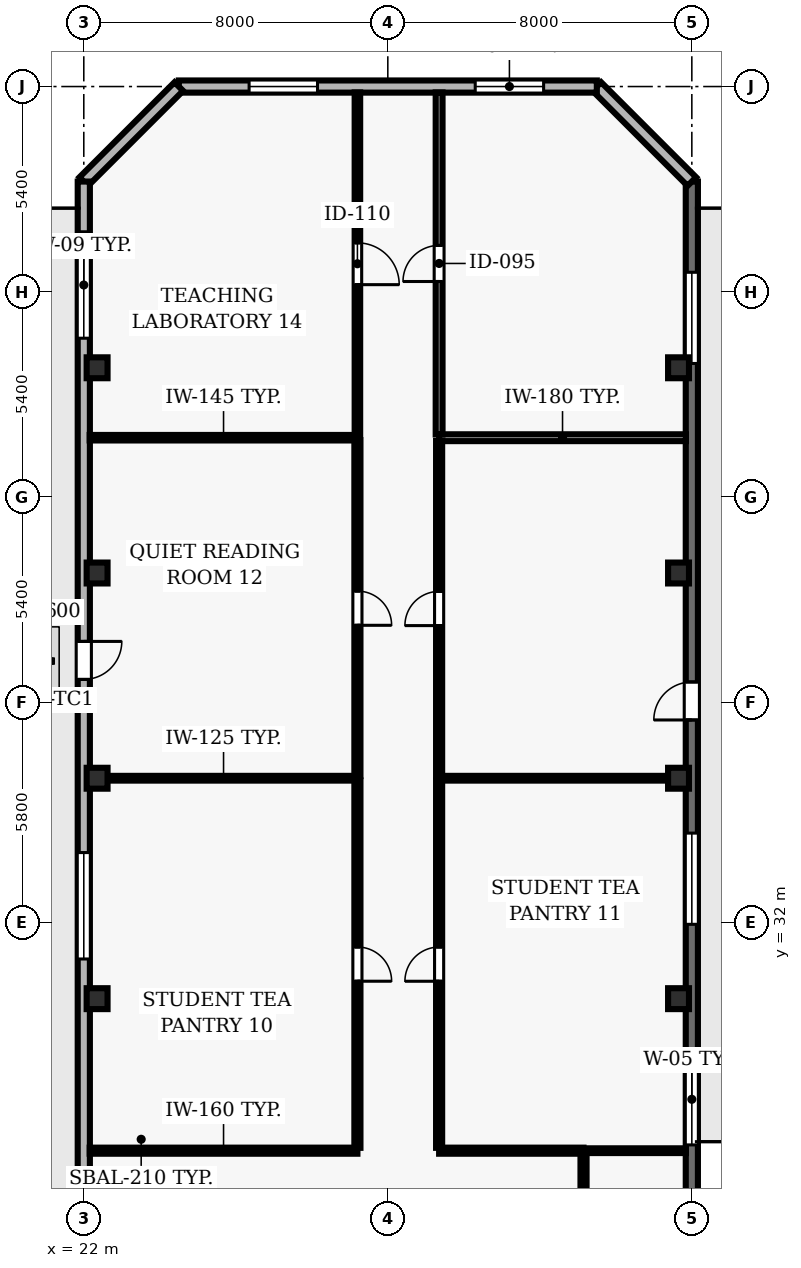
"""IFC4 building model, lengths in metres.
Left out: names, types, materials, properties, quantities, classifications, styles, units other than length and angle.
Written with IfcOpenShell. Run it as: python <this file> out.ifc"""

import sys

from ifc_helpers import new_model, si_unit, direction, frame, frame_2d, origin, origin_2d, place, context, subcontext, project, spatial, rectangle, hollow_rectangle, extrude, element, fill, save


model = new_model("IFC4")
c1 = context("Model", 3, precision=1e-05, world=origin(), true_north=direction((0.0, 1.0)))
c2 = subcontext(c1, "Body", "Model", "MODEL_VIEW")
j1 = project(units=[si_unit("LENGTHUNIT", "METRE"), si_unit("PLANEANGLEUNIT", "RADIAN")], contexts=[c1])
p1 = place(None, origin())
s1 = spatial("IfcSite", under=j1, at=p1, CompositionType="ELEMENT")
p2 = place(p1, origin())
s2 = spatial("IfcBuilding", under=s1, at=p2, CompositionType="ELEMENT")
p3 = place(p2, frame((0.0, 0.0, 85.6)))
s3 = spatial("IfcBuildingStorey", under=s2, at=p3, CompositionType="ELEMENT", Elevation=85.6)
for number, where, z_axis, x_axis in (
    (1, (22.35, 30.0, 0.0), (0.0, 0.0, 1.0), (1.0, 0.0, 0.0)),
    (2, (37.65, 30.0, 0.0), (0.0, 0.0, 1.0), (1.0, 0.0, 0.0)),
    (3, (22.35, 35.8, 0.0), (0.0, 0.0, 1.0), (1.0, 0.0, 0.0)),
    (4, (37.65, 35.8, 0.0), (0.0, 0.0, 1.0), (1.0, 0.0, 0.0)),
    (5, (22.35, 41.2, 0.0), (0.0, 0.0, 1.0), (1.0, 0.0, 0.0)),
    (6, (37.65, 41.2, 0.0), (0.0, 0.0, 1.0), (1.0, 0.0, 0.0)),
    (7, (22.35, 46.6, 0.0), (0.0, 0.0, 1.0), (1.0, 0.0, 0.0)),
    (8, (37.65, 46.6, 0.0), (0.0, 0.0, 1.0), (1.0, 0.0, 0.0)),
):
    element("IfcColumn", number, at=place(p3, frame(where, z_axis=z_axis, x_axis=x_axis)), inside=s3, PredefinedType="COLUMN", context=c2, shape_type="SweptSolid", body=[
        extrude(hollow_rectangle(XDim=0.55, YDim=0.55, WallThickness=0.025, at=origin_2d()), origin(), (0.0, 0.0, 1.0), 3.9),
    ])
p4 = place(p3, frame((38.0, 24.0, 0.0), z_axis=(0.0, 0.0, 1.0), x_axis=(0.0, 1.0, 0.0)))
e9 = element("IfcWall", 9, at=p4, inside=s3, PredefinedType="SOLIDWALL", context=c2, shape_type="SweptSolid", body=[
    extrude(rectangle(XDim=27.5, YDim=0.32, at=frame_2d((13.75, 0.0))), origin(), (0.0, 0.0, 1.0), 3.69),
])
p5 = place(p4, frame((13.333, 0.0, 0.0)))
e10 = element("IfcOpeningElement", 10, at=p5, cuts=e9, PredefinedType="OPENING", context=c2, shape_type="SweptSolid", body=[
    extrude(rectangle(XDim=1.0, YDim=2.2, at=frame_2d((0.5, 1.1))), frame((0.0, 0.17, 0.0), z_axis=(0.0, -1.0, 0.0), x_axis=(1.0, 0.0, 0.0)), (0.0, 0.0, 1.0), 0.34),
])
p6 = place(p4, frame((2.152, 0.0, 0.9)))
e11 = element("IfcOpeningElement", 11, at=p6, cuts=e9, PredefinedType="OPENING", context=c2, shape_type="SweptSolid", body=[
    extrude(rectangle(XDim=2.4, YDim=1.6, at=frame_2d((1.2, 0.8))), frame((0.0, 0.17, 0.0), z_axis=(0.0, -1.0, 0.0), x_axis=(1.0, 0.0, 0.0)), (0.0, 0.0, 1.0), 0.34),
])
p7 = place(p4, frame((7.956, 0.0, 0.9)))
e12 = element("IfcOpeningElement", 12, at=p7, cuts=e9, PredefinedType="OPENING", context=c2, shape_type="SweptSolid", body=[
    extrude(rectangle(XDim=2.4, YDim=1.6, at=frame_2d((1.2, 0.8))), frame((0.0, 0.17, 0.0), z_axis=(0.0, -1.0, 0.0), x_axis=(1.0, 0.0, 0.0)), (0.0, 0.0, 1.0), 0.34),
])
p8 = place(p4, frame((22.713, 0.0, 0.9)))
e13 = element("IfcOpeningElement", 13, at=p8, cuts=e9, PredefinedType="OPENING", context=c2, shape_type="SweptSolid", body=[
    extrude(rectangle(XDim=2.4, YDim=1.6, at=frame_2d((1.2, 0.8))), frame((0.0, 0.17, 0.0), z_axis=(0.0, -1.0, 0.0), x_axis=(1.0, 0.0, 0.0)), (0.0, 0.0, 1.0), 0.34),
])
p9 = place(p3, frame((38.0, 51.5, 0.0), z_axis=(0.0, 0.0, 1.0), x_axis=(-0.707106781187, 0.707106781187, 0.0)))
e14 = element("IfcWall", 14, at=p9, inside=s3, PredefinedType="SOLIDWALL", context=c2, shape_type="SweptSolid", body=[
    extrude(rectangle(XDim=3.536, YDim=0.32, at=frame_2d((1.768, 0.0))), origin(), (0.0, 0.0, 1.0), 3.69),
])
p10 = place(p3, frame((35.5, 54.0, 0.0), z_axis=(0.0, 0.0, 1.0), x_axis=(-1.0, 0.0, 0.0)))
e15 = element("IfcWall", 15, at=p10, inside=s3, PredefinedType="SOLIDWALL", context=c2, shape_type="SweptSolid", body=[
    extrude(rectangle(XDim=11.0, YDim=0.32, at=frame_2d((5.5, 0.0))), origin(), (0.0, 0.0, 1.0), 3.69),
])
p11 = place(p10, frame((1.4, 0.0, 0.9)))
e16 = element("IfcOpeningElement", 16, at=p11, cuts=e15, PredefinedType="OPENING", context=c2, shape_type="SweptSolid", body=[
    extrude(rectangle(XDim=1.8, YDim=1.8, at=frame_2d((0.9, 0.9))), frame((0.0, 0.17, 0.0), z_axis=(0.0, -1.0, 0.0), x_axis=(1.0, 0.0, 0.0)), (0.0, 0.0, 1.0), 0.34),
])
p12 = place(p10, frame((7.35, 0.0, 0.9)))
e17 = element("IfcOpeningElement", 17, at=p12, cuts=e15, PredefinedType="OPENING", context=c2, shape_type="SweptSolid", body=[
    extrude(rectangle(XDim=1.8, YDim=1.8, at=frame_2d((0.9, 0.9))), frame((0.0, 0.17, 0.0), z_axis=(0.0, -1.0, 0.0), x_axis=(1.0, 0.0, 0.0)), (0.0, 0.0, 1.0), 0.34),
])
p13 = place(p3, frame((24.5, 54.0, 0.0), z_axis=(0.0, 0.0, 1.0), x_axis=(-0.707106781187, -0.707106781187, 0.0)))
e18 = element("IfcWall", 18, at=p13, inside=s3, PredefinedType="SOLIDWALL", context=c2, shape_type="SweptSolid", body=[
    extrude(rectangle(XDim=3.536, YDim=0.32, at=frame_2d((1.768, 0.0))), origin(), (0.0, 0.0, 1.0), 3.69),
])
p14 = place(p3, frame((22.0, 51.5, 0.0), z_axis=(0.0, 0.0, 1.0), x_axis=(0.0, -1.0, 0.0)))
e19 = element("IfcWall", 19, at=p14, inside=s3, PredefinedType="SOLIDWALL", context=c2, shape_type="SweptSolid", body=[
    extrude(rectangle(XDim=49.0, YDim=0.32, at=frame_2d((24.5, 0.0))), origin(), (0.0, 0.0, 1.0), 3.69),
])
p15 = place(p14, frame((12.1, 0.0, 0.0)))
e20 = element("IfcOpeningElement", 20, at=p15, cuts=e19, PredefinedType="OPENING", context=c2, shape_type="SweptSolid", body=[
    extrude(rectangle(XDim=1.0, YDim=2.2, at=frame_2d((0.5, 1.1))), frame((0.0, 0.17, 0.0), z_axis=(0.0, -1.0, 0.0), x_axis=(1.0, 0.0, 0.0)), (0.0, 0.0, 1.0), 0.34),
])
p16 = place(p14, frame((1.322, 0.0, 0.9)))
e21 = element("IfcOpeningElement", 21, at=p16, cuts=e19, PredefinedType="OPENING", context=c2, shape_type="SweptSolid", body=[
    extrude(rectangle(XDim=2.8, YDim=1.8, at=frame_2d((1.4, 0.9))), frame((0.0, 0.17, 0.0), z_axis=(0.0, -1.0, 0.0), x_axis=(1.0, 0.0, 0.0)), (0.0, 0.0, 1.0), 0.34),
])
p17 = place(p14, frame((17.656, 0.0, 0.9)))
e22 = element("IfcOpeningElement", 22, at=p17, cuts=e19, PredefinedType="OPENING", context=c2, shape_type="SweptSolid", body=[
    extrude(rectangle(XDim=2.8, YDim=1.8, at=frame_2d((1.4, 0.9))), frame((0.0, 0.17, 0.0), z_axis=(0.0, -1.0, 0.0), x_axis=(1.0, 0.0, 0.0)), (0.0, 0.0, 1.0), 0.34),
])
p18 = place(p14, frame((28.994, 0.0, 0.9)))
e23 = element("IfcOpeningElement", 23, at=p18, cuts=e19, PredefinedType="OPENING", context=c2, shape_type="SweptSolid", body=[
    extrude(rectangle(XDim=2.8, YDim=1.8, at=frame_2d((1.4, 0.9))), frame((0.0, 0.17, 0.0), z_axis=(0.0, -1.0, 0.0), x_axis=(1.0, 0.0, 0.0)), (0.0, 0.0, 1.0), 0.34),
])
p19 = place(p14, frame((33.089, 0.0, 0.9)))
e24 = element("IfcOpeningElement", 24, at=p19, cuts=e19, PredefinedType="OPENING", context=c2, shape_type="SweptSolid", body=[
    extrude(rectangle(XDim=2.8, YDim=1.8, at=frame_2d((1.4, 0.9))), frame((0.0, 0.17, 0.0), z_axis=(0.0, -1.0, 0.0), x_axis=(1.0, 0.0, 0.0)), (0.0, 0.0, 1.0), 0.34),
])
p20 = place(p14, frame((39.433, 0.0, 0.9)))
e25 = element("IfcOpeningElement", 25, at=p20, cuts=e19, PredefinedType="OPENING", context=c2, shape_type="SweptSolid", body=[
    extrude(rectangle(XDim=2.8, YDim=1.8, at=frame_2d((1.4, 0.9))), frame((0.0, 0.17, 0.0), z_axis=(0.0, -1.0, 0.0), x_axis=(1.0, 0.0, 0.0)), (0.0, 0.0, 1.0), 0.34),
])
p21 = place(p3, frame((29.2, 26.0, 0.0), z_axis=(0.0, 0.0, 1.0), x_axis=(-1.0, 0.0, 0.0)))
e26 = element("IfcWall", 26, at=p21, inside=s3, PredefinedType="PARTITIONING", context=c2, shape_type="SweptSolid", body=[
    extrude(rectangle(XDim=7.045, YDim=0.16, at=frame_2d((3.522, 0.0))), origin(), (0.0, 0.0, 1.0), 3.69),
])
p22 = place(p3, frame((29.2, 35.8, 0.0), z_axis=(0.0, 0.0, 1.0), x_axis=(-1.0, 0.0, 0.0)))
e27 = element("IfcWall", 27, at=p22, inside=s3, PredefinedType="PARTITIONING", context=c2, shape_type="SweptSolid", body=[
    extrude(rectangle(XDim=7.045, YDim=0.125, at=frame_2d((3.522, 0.0))), origin(), (0.0, 0.0, 1.0), 2.995),
])
p23 = place(p3, frame((29.2, 44.76, 0.0), z_axis=(0.0, 0.0, 1.0), x_axis=(-1.0, 0.0, 0.0)))
e28 = element("IfcWall", 28, at=p23, inside=s3, PredefinedType="PARTITIONING", context=c2, shape_type="SweptSolid", body=[
    extrude(rectangle(XDim=7.045, YDim=0.145, at=frame_2d((3.522, 0.0))), origin(), (0.0, 0.0, 1.0), 3.69),
])
p24 = place(p3, frame((35.15, 26.0, 0.0), z_axis=(0.0, 0.0, 1.0), x_axis=(-1.0, 0.0, 0.0)))
e29 = element("IfcWall", 29, at=p24, inside=s3, PredefinedType="PARTITIONING", context=c2, shape_type="SweptSolid", body=[
    extrude(rectangle(XDim=3.8, YDim=0.16, at=frame_2d((1.9, 0.0))), origin(), (0.0, 0.0, 1.0), 3.69),
])
p25 = place(p3, frame((35.15, 26.0, 0.0), z_axis=(0.0, 0.0, 1.0), x_axis=(1.0, 0.0, 0.0)))
e30 = element("IfcWall", 30, at=p25, inside=s3, PredefinedType="PARTITIONING", context=c2, shape_type="SweptSolid", body=[
    extrude(rectangle(XDim=2.695, YDim=0.125, at=frame_2d((1.348, 0.0))), origin(), (0.0, 0.0, 1.0), 3.69),
])
p26 = place(p3, frame((37.845, 35.8, 0.0), z_axis=(0.0, 0.0, 1.0), x_axis=(-1.0, 0.0, 0.0)))
e31 = element("IfcWall", 31, at=p26, inside=s3, PredefinedType="PARTITIONING", context=c2, shape_type="SweptSolid", body=[
    extrude(rectangle(XDim=6.495, YDim=0.125, at=frame_2d((3.248, 0.0))), origin(), (0.0, 0.0, 1.0), 2.995),
])
p27 = place(p3, frame((37.845, 44.76, 0.0), z_axis=(0.0, 0.0, 1.0), x_axis=(-1.0, 0.0, 0.0)))
e32 = element("IfcWall", 32, at=p27, inside=s3, PredefinedType="PARTITIONING", context=c2, shape_type="SweptSolid", body=[
    extrude(rectangle(XDim=6.495, YDim=0.18, at=frame_2d((3.248, 0.0))), origin(), (0.0, 0.0, 1.0), 3.69),
])
p28 = place(p3, frame((29.2, 35.742, 0.0), z_axis=(0.0, 0.0, 1.0), x_axis=(0.0, -1.0, 0.0)))
e33 = element("IfcWall", 33, at=p28, inside=s3, PredefinedType="PARTITIONING", context=c2, shape_type="SweptSolid", body=[
    extrude(rectangle(XDim=9.667, YDim=0.16, at=frame_2d((4.833, 0.0))), origin(), (0.0, 0.0, 1.0), 3.69),
])
p29 = place(p28, frame((4.383, 0.0, 0.0)))
e34 = element("IfcOpeningElement", 34, at=p29, cuts=e33, PredefinedType="OPENING", context=c2, shape_type="SweptSolid", body=[
    extrude(rectangle(XDim=0.9, YDim=2.1, at=frame_2d((0.45, 1.05))), frame((0.0, 0.09, 0.0), z_axis=(0.0, -1.0, 0.0), x_axis=(1.0, 0.0, 0.0)), (0.0, 0.0, 1.0), 0.18),
])
p30 = place(p3, frame((29.2, 44.692, 0.0), z_axis=(0.0, 0.0, 1.0), x_axis=(0.0, -1.0, 0.0)))
e35 = element("IfcWall", 35, at=p30, inside=s3, PredefinedType="PARTITIONING", context=c2, shape_type="SweptSolid", body=[
    extrude(rectangle(XDim=8.835, YDim=0.16, at=frame_2d((4.417, 0.0))), origin(), (0.0, 0.0, 1.0), 3.69),
])
p31 = place(p30, frame((3.968, 0.0, 0.0)))
e36 = element("IfcOpeningElement", 36, at=p31, cuts=e35, PredefinedType="OPENING", context=c2, shape_type="SweptSolid", body=[
    extrude(rectangle(XDim=0.9, YDim=2.1, at=frame_2d((0.45, 1.05))), frame((0.0, 0.09, 0.0), z_axis=(0.0, -1.0, 0.0), x_axis=(1.0, 0.0, 0.0)), (0.0, 0.0, 1.0), 0.18),
])
p32 = place(p3, frame((29.2, 53.845, 0.0), z_axis=(0.0, 0.0, 1.0), x_axis=(0.0, -1.0, 0.0)))
e37 = element("IfcWall", 37, at=p32, inside=s3, PredefinedType="PARTITIONING", context=c2, shape_type="SweptSolid", body=[
    extrude(rectangle(XDim=9.017, YDim=0.145, at=frame_2d((4.509, 0.0))), origin(), (0.0, 0.0, 1.0), 3.69),
])
p33 = place(p32, frame((3.958, 0.0, 0.0)))
e38 = element("IfcOpeningElement", 38, at=p33, cuts=e37, PredefinedType="OPENING", context=c2, shape_type="SweptSolid", body=[
    extrude(rectangle(XDim=1.1, YDim=2.15, at=frame_2d((0.55, 1.075))), frame((0.0, 0.083, 0.0), z_axis=(0.0, -1.0, 0.0), x_axis=(1.0, 0.0, 0.0)), (0.0, 0.0, 1.0), 0.165),
])
p34 = place(p3, frame((31.35, 26.075, 0.0), z_axis=(0.0, 0.0, 1.0), x_axis=(0.0, 1.0, 0.0)))
e39 = element("IfcWall", 39, at=p34, inside=s3, PredefinedType="PARTITIONING", context=c2, shape_type="SweptSolid", body=[
    extrude(rectangle(XDim=9.667, YDim=0.16, at=frame_2d((4.833, 0.0))), origin(), (0.0, 0.0, 1.0), 3.69),
])
p35 = place(p34, frame((4.383, 0.0, 0.0)))
e40 = element("IfcOpeningElement", 40, at=p35, cuts=e39, PredefinedType="OPENING", context=c2, shape_type="SweptSolid", body=[
    extrude(rectangle(XDim=0.9, YDim=2.1, at=frame_2d((0.45, 1.05))), frame((0.0, 0.09, 0.0), z_axis=(0.0, -1.0, 0.0), x_axis=(1.0, 0.0, 0.0)), (0.0, 0.0, 1.0), 0.18),
])
p36 = place(p3, frame((31.35, 35.857, 0.0), z_axis=(0.0, 0.0, 1.0), x_axis=(0.0, 1.0, 0.0)))
e41 = element("IfcWall", 41, at=p36, inside=s3, PredefinedType="PARTITIONING", context=c2, shape_type="SweptSolid", body=[
    extrude(rectangle(XDim=8.818, YDim=0.16, at=frame_2d((4.409, 0.0))), origin(), (0.0, 0.0, 1.0), 3.69),
])
p37 = place(p36, frame((3.959, 0.0, 0.0)))
e42 = element("IfcOpeningElement", 42, at=p37, cuts=e41, PredefinedType="OPENING", context=c2, shape_type="SweptSolid", body=[
    extrude(rectangle(XDim=0.9, YDim=2.1, at=frame_2d((0.45, 1.05))), frame((0.0, 0.09, 0.0), z_axis=(0.0, -1.0, 0.0), x_axis=(1.0, 0.0, 0.0)), (0.0, 0.0, 1.0), 0.18),
])
p38 = place(p3, frame((31.35, 44.845, 0.0), z_axis=(0.0, 0.0, 1.0), x_axis=(0.0, 1.0, 0.0)))
e43 = element("IfcWall", 43, at=p38, inside=s3, PredefinedType="PARTITIONING", context=c2, shape_type="SweptSolid", body=[
    extrude(rectangle(XDim=9.0, YDim=0.18, at=frame_2d((4.5, 0.0))), origin(), (0.0, 0.0, 1.0), 3.69),
])
p39 = place(p38, frame((4.025, 0.0, 0.0)))
e44 = element("IfcOpeningElement", 44, at=p39, cuts=e43, PredefinedType="OPENING", context=c2, shape_type="SweptSolid", body=[
    extrude(rectangle(XDim=0.95, YDim=2.1, at=frame_2d((0.475, 1.05))), frame((0.0, 0.1, 0.0), z_axis=(0.0, -1.0, 0.0), x_axis=(1.0, 0.0, 0.0)), (0.0, 0.0, 1.0), 0.2),
])
p40 = place(p3, frame((35.15, 24.07, 0.0), z_axis=(0.0, 0.0, 1.0), x_axis=(0.0, 1.0, 0.0)))
e45 = element("IfcWall", 45, at=p40, inside=s3, PredefinedType="PARTITIONING", context=c2, shape_type="SweptSolid", body=[
    extrude(rectangle(XDim=1.855, YDim=0.16, at=frame_2d((0.927, 0.0))), origin(), (0.0, 0.0, 1.0), 3.69),
])
p41 = place(p5, origin())
e46 = element("IfcDoor", 46, at=p41, inside=s3, OperationType="SINGLE_SWING_LEFT", PredefinedType="DOOR", context=c2, shape_type="SweptSolid", body=[
    extrude(rectangle(XDim=1.0, YDim=2.2, at=frame_2d((0.5, 1.1))), frame((0.0, 0.025, 0.0), z_axis=(0.0, -1.0, 0.0), x_axis=(1.0, 0.0, 0.0)), (0.0, 0.0, 1.0), 0.05),
])
fill(e10, e46)
p42 = place(p6, origin())
e47 = element("IfcWindow", 47, at=p42, inside=s3, PartitioningType="SINGLE_PANEL", PredefinedType="WINDOW", context=c2, shape_type="SweptSolid", body=[
    extrude(rectangle(XDim=2.4, YDim=1.6, at=frame_2d((1.2, 0.8))), frame((0.0, 0.03, 0.0), z_axis=(0.0, -1.0, 0.0), x_axis=(1.0, 0.0, 0.0)), (0.0, 0.0, 1.0), 0.06),
])
fill(e11, e47)
p43 = place(p7, origin())
e48 = element("IfcWindow", 48, at=p43, inside=s3, PartitioningType="SINGLE_PANEL", PredefinedType="WINDOW", context=c2, shape_type="SweptSolid", body=[
    extrude(rectangle(XDim=2.4, YDim=1.6, at=frame_2d((1.2, 0.8))), frame((0.0, 0.03, 0.0), z_axis=(0.0, -1.0, 0.0), x_axis=(1.0, 0.0, 0.0)), (0.0, 0.0, 1.0), 0.06),
])
fill(e12, e48)
p44 = place(p8, origin())
e49 = element("IfcWindow", 49, at=p44, inside=s3, PartitioningType="SINGLE_PANEL", PredefinedType="WINDOW", context=c2, shape_type="SweptSolid", body=[
    extrude(rectangle(XDim=2.4, YDim=1.6, at=frame_2d((1.2, 0.8))), frame((0.0, 0.03, 0.0), z_axis=(0.0, -1.0, 0.0), x_axis=(1.0, 0.0, 0.0)), (0.0, 0.0, 1.0), 0.06),
])
fill(e13, e49)
p45 = place(p11, origin())
e50 = element("IfcWindow", 50, at=p45, inside=s3, PartitioningType="SINGLE_PANEL", PredefinedType="WINDOW", context=c2, shape_type="SweptSolid", body=[
    extrude(rectangle(XDim=1.8, YDim=1.8, at=frame_2d((0.9, 0.9))), frame((0.0, 0.03, 0.0), z_axis=(0.0, -1.0, 0.0), x_axis=(1.0, 0.0, 0.0)), (0.0, 0.0, 1.0), 0.06),
])
fill(e16, e50)
p46 = place(p12, origin())
e51 = element("IfcWindow", 51, at=p46, inside=s3, PartitioningType="SINGLE_PANEL", PredefinedType="WINDOW", context=c2, shape_type="SweptSolid", body=[
    extrude(rectangle(XDim=1.8, YDim=1.8, at=frame_2d((0.9, 0.9))), frame((0.0, 0.03, 0.0), z_axis=(0.0, -1.0, 0.0), x_axis=(1.0, 0.0, 0.0)), (0.0, 0.0, 1.0), 0.06),
])
fill(e17, e51)
p47 = place(p15, origin())
e52 = element("IfcDoor", 52, at=p47, inside=s3, OperationType="SINGLE_SWING_LEFT", PredefinedType="DOOR", context=c2, shape_type="SweptSolid", body=[
    extrude(rectangle(XDim=1.0, YDim=2.2, at=frame_2d((0.5, 1.1))), frame((0.0, 0.025, 0.0), z_axis=(0.0, -1.0, 0.0), x_axis=(1.0, 0.0, 0.0)), (0.0, 0.0, 1.0), 0.05),
])
fill(e20, e52)
p48 = place(p16, origin())
e53 = element("IfcWindow", 53, at=p48, inside=s3, PartitioningType="SINGLE_PANEL", PredefinedType="WINDOW", context=c2, shape_type="SweptSolid", body=[
    extrude(rectangle(XDim=2.8, YDim=1.8, at=frame_2d((1.4, 0.9))), frame((0.0, 0.03, 0.0), z_axis=(0.0, -1.0, 0.0), x_axis=(1.0, 0.0, 0.0)), (0.0, 0.0, 1.0), 0.06),
])
fill(e21, e53)
p49 = place(p17, origin())
e54 = element("IfcWindow", 54, at=p49, inside=s3, PartitioningType="SINGLE_PANEL", PredefinedType="WINDOW", context=c2, shape_type="SweptSolid", body=[
    extrude(rectangle(XDim=2.8, YDim=1.8, at=frame_2d((1.4, 0.9))), frame((0.0, 0.03, 0.0), z_axis=(0.0, -1.0, 0.0), x_axis=(1.0, 0.0, 0.0)), (0.0, 0.0, 1.0), 0.06),
])
fill(e22, e54)
p50 = place(p29, origin())
e55 = element("IfcDoor", 55, at=p50, inside=s3, OperationType="SINGLE_SWING_RIGHT", PredefinedType="DOOR", context=c2, shape_type="SweptSolid", body=[
    extrude(rectangle(XDim=0.9, YDim=2.1, at=frame_2d((0.45, 1.05))), frame((0.0, 0.025, 0.0), z_axis=(0.0, -1.0, 0.0), x_axis=(1.0, 0.0, 0.0)), (0.0, 0.0, 1.0), 0.05),
])
fill(e34, e55)
p51 = place(p35, origin())
e56 = element("IfcDoor", 56, at=p51, inside=s3, OperationType="SINGLE_SWING_LEFT", PredefinedType="DOOR", context=c2, shape_type="SweptSolid", body=[
    extrude(rectangle(XDim=0.9, YDim=2.1, at=frame_2d((0.45, 1.05))), frame((0.0, 0.025, 0.0), z_axis=(0.0, -1.0, 0.0), x_axis=(1.0, 0.0, 0.0)), (0.0, 0.0, 1.0), 0.05),
])
fill(e40, e56)
p52 = place(p31, origin())
e57 = element("IfcDoor", 57, at=p52, inside=s3, OperationType="SINGLE_SWING_RIGHT", PredefinedType="DOOR", context=c2, shape_type="SweptSolid", body=[
    extrude(rectangle(XDim=0.9, YDim=2.1, at=frame_2d((0.45, 1.05))), frame((0.0, 0.025, 0.0), z_axis=(0.0, -1.0, 0.0), x_axis=(1.0, 0.0, 0.0)), (0.0, 0.0, 1.0), 0.05),
])
fill(e36, e57)
p53 = place(p37, origin())
e58 = element("IfcDoor", 58, at=p53, inside=s3, OperationType="SINGLE_SWING_LEFT", PredefinedType="DOOR", context=c2, shape_type="SweptSolid", body=[
    extrude(rectangle(XDim=0.9, YDim=2.1, at=frame_2d((0.45, 1.05))), frame((0.0, 0.025, 0.0), z_axis=(0.0, -1.0, 0.0), x_axis=(1.0, 0.0, 0.0)), (0.0, 0.0, 1.0), 0.05),
])
fill(e42, e58)
p54 = place(p33, origin())
e59 = element("IfcDoor", 59, at=p54, inside=s3, OperationType="SINGLE_SWING_RIGHT", PredefinedType="DOOR", context=c2, shape_type="SweptSolid", body=[
    extrude(rectangle(XDim=1.1, YDim=2.15, at=frame_2d((0.55, 1.075))), frame((0.0, 0.025, 0.0), z_axis=(0.0, -1.0, 0.0), x_axis=(1.0, 0.0, 0.0)), (0.0, 0.0, 1.0), 0.05),
])
fill(e38, e59)
p55 = place(p39, origin())
e60 = element("IfcDoor", 60, at=p55, inside=s3, OperationType="SINGLE_SWING_LEFT", PredefinedType="DOOR", context=c2, shape_type="SweptSolid", body=[
    extrude(rectangle(XDim=0.95, YDim=2.1, at=frame_2d((0.475, 1.05))), frame((0.0, 0.025, 0.0), z_axis=(0.0, -1.0, 0.0), x_axis=(1.0, 0.0, 0.0)), (0.0, 0.0, 1.0), 0.05),
])
fill(e44, e60)
save(model, sys.argv[1])
